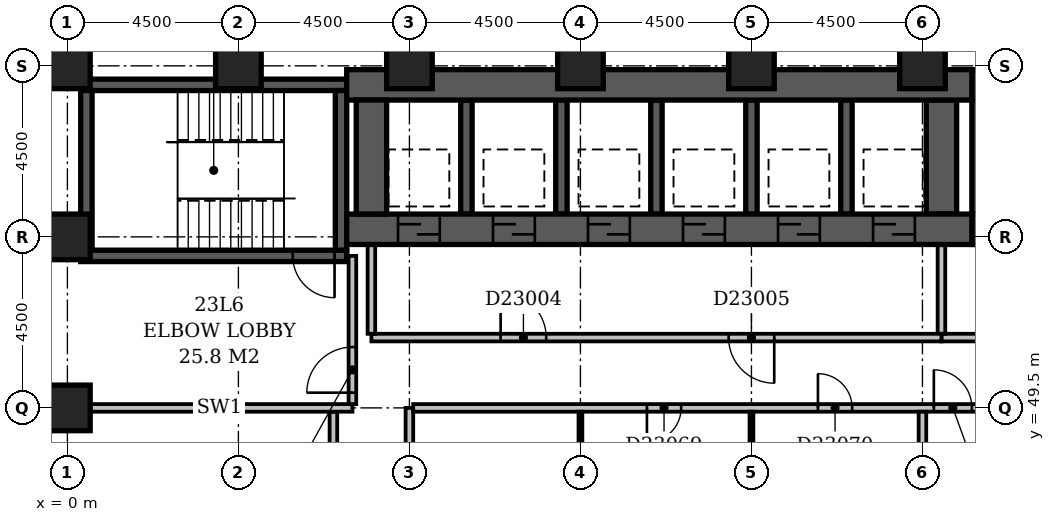
"""IFC4 building model, lengths in metres.
Left out: names, types, materials, properties, quantities, classifications, styles, units other than length and angle.
Written with IfcOpenShell. Run it as: python <this file> out.ifc"""

import sys

from ifc_helpers import new_model, si_unit, direction, frame, frame_2d, origin, origin_2d, place, context, subcontext, project, spatial, rectangle, extrude, element, fill, save


model = new_model("IFC4")
c1 = context("Model", 3, precision=1e-05, world=origin(), true_north=direction((0.0, 1.0)))
c2 = subcontext(c1, "Body", "Model", "MODEL_VIEW")
j1 = project(units=[si_unit("LENGTHUNIT", "METRE"), si_unit("PLANEANGLEUNIT", "RADIAN")], contexts=[c1])
p1 = place(None, origin())
s1 = spatial("IfcSite", under=j1, at=p1, CompositionType="ELEMENT")
p2 = place(p1, origin())
s2 = spatial("IfcBuilding", under=s1, at=p2, CompositionType="ELEMENT")
p3 = place(p2, frame((0.0, 0.0, 93.8)))
s3 = spatial("IfcBuildingStorey", under=s2, at=p3, CompositionType="ELEMENT", Elevation=93.8)
p4 = place(p3, frame((0.35, 53.5, -0.3), z_axis=(0.0, 0.0, 1.0), x_axis=(1.0, 0.0, 0.0)))
e1 = element("IfcWall", 1, at=p4, inside=s3, PredefinedType="SHEAR", context=c2, shape_type="SweptSolid", body=[
    extrude(rectangle(XDim=7.0, YDim=0.3, at=frame_2d((3.5, 0.0))), origin(), (0.0, 0.0, 1.0), 3.6),
])
p5 = place(p4, frame((5.58, 0.0, 0.3)))
e2 = element("IfcOpeningElement", 2, at=p5, cuts=e1, PredefinedType="OPENING", context=c2, shape_type="SweptSolid", body=[
    extrude(rectangle(XDim=1.1, YDim=2.1, at=frame_2d((0.55, 1.05))), frame((0.0, 0.162, 0.0), z_axis=(0.0, -1.0, 0.0), x_axis=(1.0, 0.0, 0.0)), (0.0, 0.0, 1.0), 0.324),
])
p6 = place(p3, frame((0.35, 58.0, -0.3), z_axis=(0.0, 0.0, 1.0), x_axis=(1.0, 0.0, 0.0)))
e3 = element("IfcWall", 3, at=p6, inside=s3, PredefinedType="SHEAR", context=c2, shape_type="SweptSolid", body=[
    extrude(rectangle(XDim=7.0, YDim=0.3, at=frame_2d((3.5, 0.0))), origin(), (0.0, 0.0, 1.0), 3.6),
])
for number, where, z_axis, x_axis in (
    (4, (0.5, 53.65, -0.3), (0.0, 0.0, 1.0), (0.0, 1.0, 0.0)),
    (5, (7.2, 53.65, -0.3), (0.0, 0.0, 1.0), (0.0, 1.0, 0.0)),
):
    element("IfcWall", number, at=place(p3, frame(where, z_axis=z_axis, x_axis=x_axis)), inside=s3, PredefinedType="SHEAR", context=c2, shape_type="SweptSolid", body=[
        extrude(rectangle(XDim=4.2, YDim=0.3, at=frame_2d((2.1, 0.0))), origin(), (0.0, 0.0, 1.0), 3.6),
    ])
p7 = place(p3, frame((7.35, 54.2, -0.3), z_axis=(0.0, 0.0, 1.0), x_axis=(1.0, 0.0, 0.0)))
e6 = element("IfcWall", 6, at=p7, inside=s3, PredefinedType="SHEAR", context=c2, shape_type="SweptSolid", body=[
    extrude(rectangle(XDim=16.45, YDim=0.8, at=frame_2d((8.225, 0.0))), origin(), (0.0, 0.0, 1.0), 3.6),
])
p8 = place(p7, frame((1.35, 0.0, 0.3)))
e7 = element("IfcOpeningElement", 7, at=p8, cuts=e6, PredefinedType="OPENING", context=c2, shape_type="SweptSolid", body=[
    extrude(rectangle(XDim=1.1, YDim=2.1, at=frame_2d((0.55, 1.05))), frame((0.0, 0.412, 0.0), z_axis=(0.0, -1.0, 0.0), x_axis=(1.0, 0.0, 0.0)), (0.0, 0.0, 1.0), 0.824),
])
p9 = place(p7, frame((3.85, 0.0, 0.3)))
e8 = element("IfcOpeningElement", 8, at=p9, cuts=e6, PredefinedType="OPENING", context=c2, shape_type="SweptSolid", body=[
    extrude(rectangle(XDim=1.1, YDim=2.1, at=frame_2d((0.55, 1.05))), frame((0.0, 0.412, 0.0), z_axis=(0.0, -1.0, 0.0), x_axis=(1.0, 0.0, 0.0)), (0.0, 0.0, 1.0), 0.824),
])
p10 = place(p7, frame((6.35, 0.0, 0.3)))
e9 = element("IfcOpeningElement", 9, at=p10, cuts=e6, PredefinedType="OPENING", context=c2, shape_type="SweptSolid", body=[
    extrude(rectangle(XDim=1.1, YDim=2.1, at=frame_2d((0.55, 1.05))), frame((0.0, 0.412, 0.0), z_axis=(0.0, -1.0, 0.0), x_axis=(1.0, 0.0, 0.0)), (0.0, 0.0, 1.0), 0.824),
])
p11 = place(p7, frame((8.85, 0.0, 0.3)))
e10 = element("IfcOpeningElement", 10, at=p11, cuts=e6, PredefinedType="OPENING", context=c2, shape_type="SweptSolid", body=[
    extrude(rectangle(XDim=1.1, YDim=2.1, at=frame_2d((0.55, 1.05))), frame((0.0, 0.412, 0.0), z_axis=(0.0, -1.0, 0.0), x_axis=(1.0, 0.0, 0.0)), (0.0, 0.0, 1.0), 0.824),
])
p12 = place(p7, frame((11.35, 0.0, 0.3)))
e11 = element("IfcOpeningElement", 11, at=p12, cuts=e6, PredefinedType="OPENING", context=c2, shape_type="SweptSolid", body=[
    extrude(rectangle(XDim=1.1, YDim=2.1, at=frame_2d((0.55, 1.05))), frame((0.0, 0.412, 0.0), z_axis=(0.0, -1.0, 0.0), x_axis=(1.0, 0.0, 0.0)), (0.0, 0.0, 1.0), 0.824),
])
p13 = place(p7, frame((13.85, 0.0, 0.3)))
e12 = element("IfcOpeningElement", 12, at=p13, cuts=e6, PredefinedType="OPENING", context=c2, shape_type="SweptSolid", body=[
    extrude(rectangle(XDim=1.1, YDim=2.1, at=frame_2d((0.55, 1.05))), frame((0.0, 0.412, 0.0), z_axis=(0.0, -1.0, 0.0), x_axis=(1.0, 0.0, 0.0)), (0.0, 0.0, 1.0), 0.824),
])
p14 = place(p3, frame((7.35, 58.0, -0.3), z_axis=(0.0, 0.0, 1.0), x_axis=(1.0, 0.0, 0.0)))
e13 = element("IfcWall", 13, at=p14, inside=s3, PredefinedType="SHEAR", context=c2, shape_type="SweptSolid", body=[
    extrude(rectangle(XDim=16.45, YDim=0.8, at=frame_2d((8.225, 0.0))), origin(), (0.0, 0.0, 1.0), 3.6),
])
p15 = place(p3, frame((8.0, 54.6, -0.3), z_axis=(0.0, 0.0, 1.0), x_axis=(0.0, 1.0, 0.0)))
e14 = element("IfcWall", 14, at=p15, inside=s3, PredefinedType="SHEAR", context=c2, shape_type="SweptSolid", body=[
    extrude(rectangle(XDim=3.0, YDim=0.8, at=frame_2d((1.5, 0.0))), origin(), (0.0, 0.0, 1.0), 3.6),
])
for number, where, z_axis, x_axis in (
    (15, (10.5, 54.6, -0.3), (0.0, 0.0, 1.0), (0.0, 1.0, 0.0)),
    (16, (13.0, 54.6, -0.3), (0.0, 0.0, 1.0), (0.0, 1.0, 0.0)),
    (17, (15.5, 54.6, -0.3), (0.0, 0.0, 1.0), (0.0, 1.0, 0.0)),
    (18, (18.0, 54.6, -0.3), (0.0, 0.0, 1.0), (0.0, 1.0, 0.0)),
    (19, (20.5, 54.6, -0.3), (0.0, 0.0, 1.0), (0.0, 1.0, 0.0)),
):
    element("IfcWall", number, at=place(p3, frame(where, z_axis=z_axis, x_axis=x_axis)), inside=s3, PredefinedType="SHEAR", context=c2, shape_type="SweptSolid", body=[
        extrude(rectangle(XDim=3.0, YDim=0.3, at=frame_2d((1.5, 0.0))), origin(), (0.0, 0.0, 1.0), 3.6),
    ])
p16 = place(p3, frame((23.0, 54.6, -0.3), z_axis=(0.0, 0.0, 1.0), x_axis=(0.0, 1.0, 0.0)))
e20 = element("IfcWall", 20, at=p16, inside=s3, PredefinedType="SHEAR", context=c2, shape_type="SweptSolid", body=[
    extrude(rectangle(XDim=3.0, YDim=0.8, at=frame_2d((1.5, 0.0))), origin(), (0.0, 0.0, 1.0), 3.6),
])
p17 = place(p3, frame((23.8, 54.2, -0.3), z_axis=(0.0, 0.0, 1.0), x_axis=(1.0, 0.0, 0.0)))
e21 = element("IfcWall", 21, at=p17, inside=s3, PredefinedType="SHEAR", context=c2, shape_type="SweptSolid", body=[
    extrude(rectangle(XDim=3.3, YDim=0.8, at=frame_2d((1.65, 0.0))), origin(), (0.0, 0.0, 1.0), 3.6),
])
p18 = place(p17, frame((1.1, 0.0, 0.3)))
e22 = element("IfcOpeningElement", 22, at=p18, cuts=e21, PredefinedType="OPENING", context=c2, shape_type="SweptSolid", body=[
    extrude(rectangle(XDim=1.1, YDim=2.1, at=frame_2d((0.55, 1.05))), frame((0.0, 0.412, 0.0), z_axis=(0.0, -1.0, 0.0), x_axis=(1.0, 0.0, 0.0)), (0.0, 0.0, 1.0), 0.824),
])
p19 = place(p3, frame((23.8, 58.0, -0.3), z_axis=(0.0, 0.0, 1.0), x_axis=(1.0, 0.0, 0.0)))
e23 = element("IfcWall", 23, at=p19, inside=s3, PredefinedType="SHEAR", context=c2, shape_type="SweptSolid", body=[
    extrude(rectangle(XDim=3.3, YDim=0.8, at=frame_2d((1.65, 0.0))), origin(), (0.0, 0.0, 1.0), 3.6),
])
p20 = place(p3, frame((24.2, 54.6, -0.3), z_axis=(0.0, 0.0, 1.0), x_axis=(0.0, 1.0, 0.0)))
e24 = element("IfcWall", 24, at=p20, inside=s3, PredefinedType="SHEAR", context=c2, shape_type="SweptSolid", body=[
    extrude(rectangle(XDim=3.0, YDim=0.8, at=frame_2d((1.5, 0.0))), origin(), (0.0, 0.0, 1.0), 3.6),
])
for number, where, z_axis, x_axis in (
    (25, (0.0, 49.5, -0.3), (0.0, 0.0, 1.0), (1.0, 0.0, 0.0)),
    (26, (0.0, 54.0, -0.3), (0.0, 0.0, 1.0), (1.0, 0.0, 0.0)),
    (27, (0.0, 58.5, -0.3), (0.0, 0.0, 1.0), (1.0, 0.0, 0.0)),
    (28, (4.5, 58.5, -0.3), (0.0, 0.0, 1.0), (1.0, 0.0, 0.0)),
    (29, (9.0, 58.5, -0.3), (0.0, 0.0, 1.0), (1.0, 0.0, 0.0)),
    (30, (13.5, 58.5, -0.3), (0.0, 0.0, 1.0), (1.0, 0.0, 0.0)),
    (31, (18.0, 58.5, -0.3), (0.0, 0.0, 1.0), (1.0, 0.0, 0.0)),
    (32, (22.5, 58.5, -0.3), (0.0, 0.0, 1.0), (1.0, 0.0, 0.0)),
):
    element("IfcColumn", number, at=place(p3, frame(where, z_axis=z_axis, x_axis=x_axis)), inside=s3, PredefinedType="COLUMN", context=c2, shape_type="SweptSolid", body=[
        extrude(rectangle(XDim=1.2, YDim=1.2, at=origin_2d()), origin(), (0.0, 0.0, 1.0), 3.6),
    ])
p21 = place(p3, frame((8.0, 51.35, 0.0), z_axis=(0.0, 0.0, 1.0), x_axis=(1.0, 0.0, 0.0)))
e33 = element("IfcWall", 33, at=p21, inside=s3, PredefinedType="PARTITIONING", context=c2, shape_type="SweptSolid", body=[
    extrude(rectangle(XDim=15.0, YDim=0.2, at=frame_2d((7.5, 0.0))), origin(), (0.0, 0.0, 1.0), 3.3),
])
p22 = place(p21, frame((3.4, 0.0, 0.0)))
e34 = element("IfcOpeningElement", 34, at=p22, cuts=e33, PredefinedType="OPENING", context=c2, shape_type="SweptSolid", body=[
    extrude(rectangle(XDim=1.2, YDim=2.1, at=frame_2d((0.6, 1.05))), frame((0.0, 0.112, 0.0), z_axis=(0.0, -1.0, 0.0), x_axis=(1.0, 0.0, 0.0)), (0.0, 0.0, 1.0), 0.224),
])
p23 = place(p21, frame((9.4, 0.0, 0.0)))
e35 = element("IfcOpeningElement", 35, at=p23, cuts=e33, PredefinedType="OPENING", context=c2, shape_type="SweptSolid", body=[
    extrude(rectangle(XDim=1.2, YDim=2.1, at=frame_2d((0.6, 1.05))), frame((0.0, 0.112, 0.0), z_axis=(0.0, -1.0, 0.0), x_axis=(1.0, 0.0, 0.0)), (0.0, 0.0, 1.0), 0.224),
])
for number, where, z_axis, x_axis in (
    (36, (23.0, 51.45, 0.0), (0.0, 0.0, 1.0), (0.0, 1.0, 0.0)),
    (37, (8.0, 51.45, 0.0), (0.0, 0.0, 1.0), (0.0, 1.0, 0.0)),
):
    element("IfcWall", number, at=place(p3, frame(where, z_axis=z_axis, x_axis=x_axis)), inside=s3, PredefinedType="PARTITIONING", context=c2, shape_type="SweptSolid", body=[
        extrude(rectangle(XDim=2.33, YDim=0.2, at=frame_2d((1.165, 0.0))), origin(), (0.0, 0.0, 1.0), 3.3),
    ])
p24 = place(p3, frame((23.0, 51.35, 0.0), z_axis=(0.0, 0.0, 1.0), x_axis=(1.0, 0.0, 0.0)))
e38 = element("IfcWall", 38, at=p24, inside=s3, PredefinedType="PARTITIONING", context=c2, shape_type="SweptSolid", body=[
    extrude(rectangle(XDim=4.8, YDim=0.2, at=frame_2d((2.4, 0.0))), origin(), (0.0, 0.0, 1.0), 3.3),
])
p25 = place(p24, frame((1.65, 0.0, 0.0)))
e39 = element("IfcOpeningElement", 39, at=p25, cuts=e38, PredefinedType="OPENING", context=c2, shape_type="SweptSolid", body=[
    extrude(rectangle(XDim=1.2, YDim=2.1, at=frame_2d((0.6, 1.05))), frame((0.0, 0.112, 0.0), z_axis=(0.0, -1.0, 0.0), x_axis=(1.0, 0.0, 0.0)), (0.0, 0.0, 1.0), 0.224),
])
p26 = place(p3, frame((0.5, 49.5, 0.0), z_axis=(0.0, 0.0, 1.0), x_axis=(1.0, 0.0, 0.0)))
e40 = element("IfcWall", 40, at=p26, inside=s3, PredefinedType="PARTITIONING", context=c2, shape_type="SweptSolid", body=[
    extrude(rectangle(XDim=7.0, YDim=0.2, at=frame_2d((3.5, 0.0))), origin(), (0.0, 0.0, 1.0), 3.3),
])
p27 = place(p3, frame((7.5, 49.6, 0.0), z_axis=(0.0, 0.0, 1.0), x_axis=(0.0, 1.0, 0.0)))
e41 = element("IfcWall", 41, at=p27, inside=s3, PredefinedType="PARTITIONING", context=c2, shape_type="SweptSolid", body=[
    extrude(rectangle(XDim=3.9, YDim=0.2, at=frame_2d((1.95, 0.0))), origin(), (0.0, 0.0, 1.0), 3.3),
])
p28 = place(p27, frame((0.3, 0.0, 0.0)))
e42 = element("IfcOpeningElement", 42, at=p28, cuts=e41, PredefinedType="OPENING", context=c2, shape_type="SweptSolid", body=[
    extrude(rectangle(XDim=1.2, YDim=2.1, at=frame_2d((0.6, 1.05))), frame((0.0, 0.112, 0.0), z_axis=(0.0, -1.0, 0.0), x_axis=(1.0, 0.0, 0.0)), (0.0, 0.0, 1.0), 0.224),
])
p29 = place(p3, frame((9.0, 5.0, 0.0), z_axis=(0.0, 0.0, 1.0), x_axis=(0.0, 1.0, 0.0)))
e43 = element("IfcWall", 43, at=p29, inside=s3, PredefinedType="PARTITIONING", context=c2, shape_type="SweptSolid", body=[
    extrude(rectangle(XDim=44.5, YDim=0.2, at=frame_2d((22.25, 0.0))), origin(), (0.0, 0.0, 1.0), 3.3),
])
p30 = place(p29, frame((18.4, 0.0, 0.0)))
e44 = element("IfcOpeningElement", 44, at=p30, cuts=e43, PredefinedType="OPENING", context=c2, shape_type="SweptSolid", body=[
    extrude(rectangle(XDim=1.0, YDim=2.1, at=frame_2d((0.5, 1.05))), frame((0.0, 0.112, 0.0), z_axis=(0.0, -1.0, 0.0), x_axis=(1.0, 0.0, 0.0)), (0.0, 0.0, 1.0), 0.224),
])
p31 = place(p29, frame((11.7, 0.0, 0.0)))
e45 = element("IfcOpeningElement", 45, at=p31, cuts=e43, PredefinedType="OPENING", context=c2, shape_type="SweptSolid", body=[
    extrude(rectangle(XDim=1.0, YDim=2.1, at=frame_2d((0.5, 1.05))), frame((0.0, 0.112, 0.0), z_axis=(0.0, -1.0, 0.0), x_axis=(1.0, 0.0, 0.0)), (0.0, 0.0, 1.0), 0.224),
])
p32 = place(p29, frame((37.25, 0.0, 0.0)))
e46 = element("IfcOpeningElement", 46, at=p32, cuts=e43, PredefinedType="OPENING", context=c2, shape_type="SweptSolid", body=[
    extrude(rectangle(XDim=0.9, YDim=2.1, at=frame_2d((0.45, 1.05))), frame((0.0, 0.112, 0.0), z_axis=(0.0, -1.0, 0.0), x_axis=(1.0, 0.0, 0.0)), (0.0, 0.0, 1.0), 0.224),
])
p33 = place(p29, frame((1.5, 0.0, 0.0)))
e47 = element("IfcOpeningElement", 47, at=p33, cuts=e43, PredefinedType="OPENING", context=c2, shape_type="SweptSolid", body=[
    extrude(rectangle(XDim=0.9, YDim=2.1, at=frame_2d((0.45, 1.05))), frame((0.0, 0.112, 0.0), z_axis=(0.0, -1.0, 0.0), x_axis=(1.0, 0.0, 0.0)), (0.0, 0.0, 1.0), 0.224),
])
p34 = place(p3, frame((7.0, 34.6, 0.0), z_axis=(0.0, 0.0, 1.0), x_axis=(0.0, 1.0, 0.0)))
e48 = element("IfcWall", 48, at=p34, inside=s3, PredefinedType="PARTITIONING", context=c2, shape_type="SweptSolid", body=[
    extrude(rectangle(XDim=14.8, YDim=0.2, at=frame_2d((7.4, 0.0))), origin(), (0.0, 0.0, 1.0), 3.3),
])
p35 = place(p34, frame((4.45, 0.0, 0.0)))
e49 = element("IfcOpeningElement", 49, at=p35, cuts=e48, PredefinedType="OPENING", context=c2, shape_type="SweptSolid", body=[
    extrude(rectangle(XDim=0.9, YDim=2.1, at=frame_2d((0.45, 1.05))), frame((0.0, 0.112, 0.0), z_axis=(0.0, -1.0, 0.0), x_axis=(1.0, 0.0, 0.0)), (0.0, 0.0, 1.0), 0.224),
])
p36 = place(p34, frame((11.95, 0.0, 0.0)))
e50 = element("IfcOpeningElement", 50, at=p36, cuts=e48, PredefinedType="OPENING", context=c2, shape_type="SweptSolid", body=[
    extrude(rectangle(XDim=0.9, YDim=2.1, at=frame_2d((0.45, 1.05))), frame((0.0, 0.112, 0.0), z_axis=(0.0, -1.0, 0.0), x_axis=(1.0, 0.0, 0.0)), (0.0, 0.0, 1.0), 0.224),
])
for number, where, z_axis, x_axis in (
    (51, (13.5, 36.1, 0.0), (0.0, 0.0, 1.0), (0.0, 1.0, 0.0)),
    (52, (18.0, 36.1, 0.0), (0.0, 0.0, 1.0), (0.0, 1.0, 0.0)),
):
    element("IfcWall", number, at=place(p3, frame(where, z_axis=z_axis, x_axis=x_axis)), inside=s3, PredefinedType="PARTITIONING", context=c2, shape_type="SweptSolid", body=[
        extrude(rectangle(XDim=13.3, YDim=0.1, at=frame_2d((6.65, 0.0))), origin(), (0.0, 0.0, 1.0), 3.3),
    ])
p37 = place(p3, frame((22.5, 36.6, 0.0), z_axis=(0.0, 0.0, 1.0), x_axis=(0.0, 1.0, 0.0)))
e53 = element("IfcWall", 53, at=p37, inside=s3, PredefinedType="PARTITIONING", context=c2, shape_type="SweptSolid", body=[
    extrude(rectangle(XDim=12.8, YDim=0.2, at=frame_2d((6.4, 0.0))), origin(), (0.0, 0.0, 1.0), 3.3),
])
p38 = place(p3, frame((9.1, 49.5, 0.0), z_axis=(0.0, 0.0, 1.0), x_axis=(1.0, 0.0, 0.0)))
e54 = element("IfcWall", 54, at=p38, inside=s3, PredefinedType="PARTITIONING", context=c2, shape_type="SweptSolid", body=[
    extrude(rectangle(XDim=57.8, YDim=0.2, at=frame_2d((28.9, 0.0))), origin(), (0.0, 0.0, 1.0), 3.3),
])
p39 = place(p38, frame((13.7, 0.0, 0.0)))
e55 = element("IfcOpeningElement", 55, at=p39, cuts=e54, PredefinedType="OPENING", context=c2, shape_type="SweptSolid", body=[
    extrude(rectangle(XDim=1.0, YDim=2.1, at=frame_2d((0.5, 1.05))), frame((0.0, 0.112, 0.0), z_axis=(0.0, -1.0, 0.0), x_axis=(1.0, 0.0, 0.0)), (0.0, 0.0, 1.0), 0.224),
])
p40 = place(p38, frame((38.6, 0.0, 0.0)))
e56 = element("IfcOpeningElement", 56, at=p40, cuts=e54, PredefinedType="OPENING", context=c2, shape_type="SweptSolid", body=[
    extrude(rectangle(XDim=1.0, YDim=2.1, at=frame_2d((0.5, 1.05))), frame((0.0, 0.112, 0.0), z_axis=(0.0, -1.0, 0.0), x_axis=(1.0, 0.0, 0.0)), (0.0, 0.0, 1.0), 0.224),
])
p41 = place(p38, frame((52.1, 0.0, 0.0)))
e57 = element("IfcOpeningElement", 57, at=p41, cuts=e54, PredefinedType="OPENING", context=c2, shape_type="SweptSolid", body=[
    extrude(rectangle(XDim=1.0, YDim=2.1, at=frame_2d((0.5, 1.05))), frame((0.0, 0.112, 0.0), z_axis=(0.0, -1.0, 0.0), x_axis=(1.0, 0.0, 0.0)), (0.0, 0.0, 1.0), 0.224),
])
p42 = place(p38, frame((6.15, 0.0, 0.0)))
e58 = element("IfcOpeningElement", 58, at=p42, cuts=e54, PredefinedType="OPENING", context=c2, shape_type="SweptSolid", body=[
    extrude(rectangle(XDim=0.9, YDim=2.1, at=frame_2d((0.45, 1.05))), frame((0.0, 0.112, 0.0), z_axis=(0.0, -1.0, 0.0), x_axis=(1.0, 0.0, 0.0)), (0.0, 0.0, 1.0), 0.224),
])
p43 = place(p38, frame((10.65, 0.0, 0.0)))
e59 = element("IfcOpeningElement", 59, at=p43, cuts=e54, PredefinedType="OPENING", context=c2, shape_type="SweptSolid", body=[
    extrude(rectangle(XDim=0.9, YDim=2.1, at=frame_2d((0.45, 1.05))), frame((0.0, 0.112, 0.0), z_axis=(0.0, -1.0, 0.0), x_axis=(1.0, 0.0, 0.0)), (0.0, 0.0, 1.0), 0.224),
])
p44 = place(p28, origin())
e60 = element("IfcDoor", 60, at=p44, inside=s3, OperationType="SINGLE_SWING_LEFT", PredefinedType="DOOR", context=c2, shape_type="SweptSolid", body=[
    extrude(rectangle(XDim=1.2, YDim=2.1, at=frame_2d((0.6, 1.05))), frame((0.0, 0.025, 0.0), z_axis=(0.0, -1.0, 0.0), x_axis=(1.0, 0.0, 0.0)), (0.0, 0.0, 1.0), 0.05),
])
fill(e42, e60)
p45 = place(p8, origin())
e61 = element("IfcDoor", 61, at=p45, inside=s3, OperationType="SLIDING_TO_LEFT", PredefinedType="DOOR", context=c2, shape_type="SweptSolid", body=[
    extrude(rectangle(XDim=1.1, YDim=2.1, at=frame_2d((0.55, 1.05))), frame((0.0, 0.025, 0.0), z_axis=(0.0, -1.0, 0.0), x_axis=(1.0, 0.0, 0.0)), (0.0, 0.0, 1.0), 0.05),
])
fill(e7, e61)
p46 = place(p9, origin())
e62 = element("IfcDoor", 62, at=p46, inside=s3, OperationType="SLIDING_TO_LEFT", PredefinedType="DOOR", context=c2, shape_type="SweptSolid", body=[
    extrude(rectangle(XDim=1.1, YDim=2.1, at=frame_2d((0.55, 1.05))), frame((0.0, 0.025, 0.0), z_axis=(0.0, -1.0, 0.0), x_axis=(1.0, 0.0, 0.0)), (0.0, 0.0, 1.0), 0.05),
])
fill(e8, e62)
p47 = place(p10, origin())
e63 = element("IfcDoor", 63, at=p47, inside=s3, OperationType="SLIDING_TO_LEFT", PredefinedType="DOOR", context=c2, shape_type="SweptSolid", body=[
    extrude(rectangle(XDim=1.1, YDim=2.1, at=frame_2d((0.55, 1.05))), frame((0.0, 0.025, 0.0), z_axis=(0.0, -1.0, 0.0), x_axis=(1.0, 0.0, 0.0)), (0.0, 0.0, 1.0), 0.05),
])
fill(e9, e63)
p48 = place(p11, origin())
e64 = element("IfcDoor", 64, at=p48, inside=s3, OperationType="SLIDING_TO_LEFT", PredefinedType="DOOR", context=c2, shape_type="SweptSolid", body=[
    extrude(rectangle(XDim=1.1, YDim=2.1, at=frame_2d((0.55, 1.05))), frame((0.0, 0.025, 0.0), z_axis=(0.0, -1.0, 0.0), x_axis=(1.0, 0.0, 0.0)), (0.0, 0.0, 1.0), 0.05),
])
fill(e10, e64)
p49 = place(p12, origin())
e65 = element("IfcDoor", 65, at=p49, inside=s3, OperationType="SLIDING_TO_LEFT", PredefinedType="DOOR", context=c2, shape_type="SweptSolid", body=[
    extrude(rectangle(XDim=1.1, YDim=2.1, at=frame_2d((0.55, 1.05))), frame((0.0, 0.025, 0.0), z_axis=(0.0, -1.0, 0.0), x_axis=(1.0, 0.0, 0.0)), (0.0, 0.0, 1.0), 0.05),
])
fill(e11, e65)
p50 = place(p13, origin())
e66 = element("IfcDoor", 66, at=p50, inside=s3, OperationType="SLIDING_TO_LEFT", PredefinedType="DOOR", context=c2, shape_type="SweptSolid", body=[
    extrude(rectangle(XDim=1.1, YDim=2.1, at=frame_2d((0.55, 1.05))), frame((0.0, 0.025, 0.0), z_axis=(0.0, -1.0, 0.0), x_axis=(1.0, 0.0, 0.0)), (0.0, 0.0, 1.0), 0.05),
])
fill(e12, e66)
p51 = place(p22, origin())
e67 = element("IfcDoor", 67, at=p51, inside=s3, OperationType="SINGLE_SWING_LEFT", PredefinedType="DOOR", context=c2, shape_type="SweptSolid", body=[
    extrude(rectangle(XDim=1.2, YDim=2.1, at=frame_2d((0.6, 1.05))), frame((0.0, 0.025, 0.0), z_axis=(0.0, -1.0, 0.0), x_axis=(1.0, 0.0, 0.0)), (0.0, 0.0, 1.0), 0.05),
])
fill(e34, e67)
p52 = place(p23, origin())
e68 = element("IfcDoor", 68, at=p52, inside=s3, OperationType="SINGLE_SWING_RIGHT", PredefinedType="DOOR", context=c2, shape_type="SweptSolid", body=[
    extrude(rectangle(XDim=1.2, YDim=2.1, at=frame_2d((0.6, 1.05))), frame((0.0, 0.025, 0.0), z_axis=(0.0, -1.0, 0.0), x_axis=(1.0, 0.0, 0.0)), (0.0, 0.0, 1.0), 0.05),
])
fill(e35, e68)
p53 = place(p5, origin())
e69 = element("IfcDoor", 69, at=p53, inside=s3, OperationType="SINGLE_SWING_RIGHT", PredefinedType="DOOR", context=c2, shape_type="SweptSolid", body=[
    extrude(rectangle(XDim=1.1, YDim=2.1, at=frame_2d((0.55, 1.05))), frame((0.0, 0.025, 0.0), z_axis=(0.0, -1.0, 0.0), x_axis=(1.0, 0.0, 0.0)), (0.0, 0.0, 1.0), 0.05),
])
fill(e2, e69)
p54 = place(p39, origin())
e70 = element("IfcDoor", 70, at=p54, inside=s3, OperationType="SINGLE_SWING_LEFT", PredefinedType="DOOR", context=c2, shape_type="SweptSolid", body=[
    extrude(rectangle(XDim=1.0, YDim=2.1, at=frame_2d((0.5, 1.05))), frame((0.0, 0.025, 0.0), z_axis=(0.0, -1.0, 0.0), x_axis=(1.0, 0.0, 0.0)), (0.0, 0.0, 1.0), 0.05),
])
fill(e55, e70)
p55 = place(p42, frame((0.9, 0.0, 0.0), z_axis=(0.0, 0.0, 1.0), x_axis=(-1.0, 0.0, 0.0)))
e71 = element("IfcDoor", 71, at=p55, inside=s3, OperationType="SINGLE_SWING_RIGHT", PredefinedType="DOOR", context=c2, shape_type="SweptSolid", body=[
    extrude(rectangle(XDim=0.9, YDim=2.1, at=frame_2d((0.45, 1.05))), frame((0.0, 0.025, 0.0), z_axis=(0.0, -1.0, 0.0), x_axis=(1.0, 0.0, 0.0)), (0.0, 0.0, 1.0), 0.05),
])
fill(e58, e71)
p56 = place(p43, origin())
e72 = element("IfcDoor", 72, at=p56, inside=s3, OperationType="SINGLE_SWING_LEFT", PredefinedType="DOOR", context=c2, shape_type="SweptSolid", body=[
    extrude(rectangle(XDim=0.9, YDim=2.1, at=frame_2d((0.45, 1.05))), frame((0.0, 0.025, 0.0), z_axis=(0.0, -1.0, 0.0), x_axis=(1.0, 0.0, 0.0)), (0.0, 0.0, 1.0), 0.05),
])
fill(e59, e72)
save(model, sys.argv[1])
